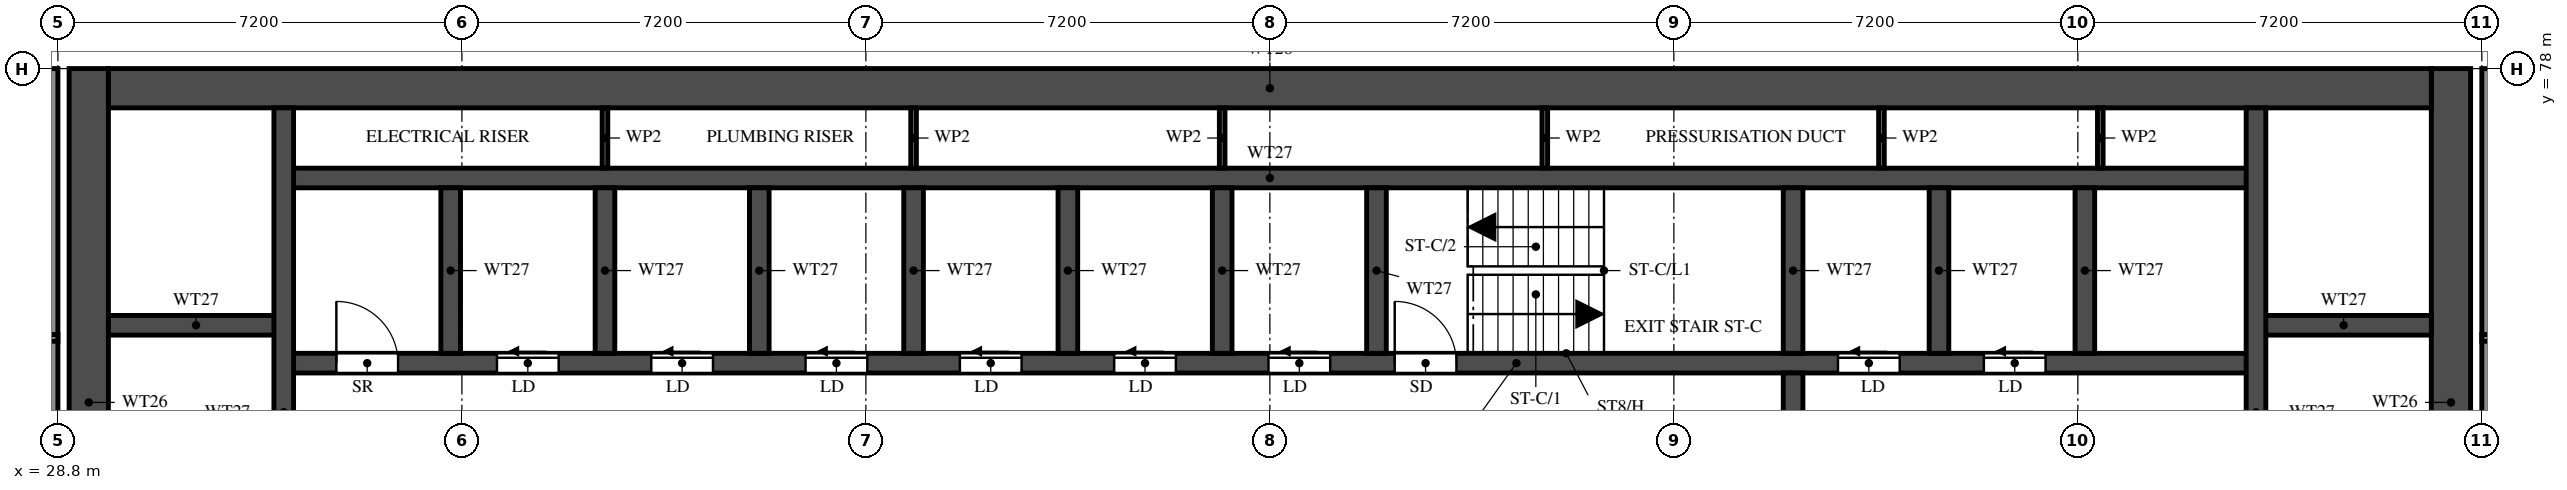
"""IFC4 building model, lengths in metres.
Left out: names, types, materials, properties, quantities, classifications, styles, units other than length and angle.
Written with IfcOpenShell. Run it as: python <this file> out.ifc"""

import sys

from ifc_helpers import new_model, si_unit, direction, frame, frame_2d, origin, place, context, subcontext, project, spatial, rectangle, extrude, element, fill, save


model = new_model("IFC4")
c1 = context("Model", 3, precision=1e-05, world=origin(), true_north=direction((0.0, 1.0)))
c2 = subcontext(c1, "Body", "Model", "MODEL_VIEW")
j1 = project(units=[si_unit("LENGTHUNIT", "METRE"), si_unit("PLANEANGLEUNIT", "RADIAN")], contexts=[c1])
p1 = place(None, origin())
s1 = spatial("IfcSite", under=j1, at=p1, CompositionType="ELEMENT")
p2 = place(p1, origin())
s2 = spatial("IfcBuilding", under=s1, at=p2, CompositionType="ELEMENT")
p3 = place(p2, frame((0.0, 0.0, 164.0)))
s3 = spatial("IfcBuildingStorey", under=s2, at=p3, CompositionType="ELEMENT", Elevation=164.0)
for number, where, z_axis, x_axis in (
    (1, (29.35, 66.1, 0.0), (0.0, 0.0, 1.0), (0.0, 1.0, 0.0)),
    (2, (71.45, 66.1, 0.0), (0.0, 0.0, 1.0), (0.0, 1.0, 0.0)),
):
    element("IfcWall", number, at=place(p3, frame(where, z_axis=z_axis, x_axis=x_axis)), inside=s3, PredefinedType="SHEAR", context=c2, shape_type="SweptSolid", body=[
        extrude(rectangle(XDim=11.9, YDim=0.7, at=frame_2d((5.95, 0.0))), origin(), (0.0, 0.0, 1.0), 3.2),
    ])
p4 = place(p3, frame((29.7, 77.65, 0.0), z_axis=(0.0, 0.0, 1.0), x_axis=(1.0, 0.0, 0.0)))
e3 = element("IfcWall", 3, at=p4, inside=s3, PredefinedType="SHEAR", context=c2, shape_type="SweptSolid", body=[
    extrude(rectangle(XDim=41.4, YDim=0.7, at=frame_2d((20.7, 0.0))), origin(), (0.0, 0.0, 1.0), 3.2),
])
p5 = place(p3, frame((32.825, 72.75, 0.0), z_axis=(0.0, 0.0, 1.0), x_axis=(1.0, 0.0, 0.0)))
e4 = element("IfcWall", 4, at=p5, inside=s3, PredefinedType="SHEAR", context=c2, shape_type="SweptSolid", body=[
    extrude(rectangle(XDim=35.15, YDim=0.35, at=frame_2d((17.575, 0.0))), origin(), (0.0, 0.0, 1.0), 3.2),
])
p6 = place(p5, frame((19.8, 0.0, 0.0)))
e5 = element("IfcOpeningElement", 5, at=p6, cuts=e4, PredefinedType="OPENING", context=c2, shape_type="SweptSolid", body=[
    extrude(rectangle(XDim=1.1, YDim=2.1, at=frame_2d((0.55, 1.05))), frame((0.0, 0.185, 0.0), z_axis=(0.0, -1.0, 0.0), x_axis=(1.0, 0.0, 0.0)), (0.0, 0.0, 1.0), 0.37),
])
p7 = place(p5, frame((27.7, 0.0, 0.0)))
e6 = element("IfcOpeningElement", 6, at=p7, cuts=e4, PredefinedType="OPENING", context=c2, shape_type="SweptSolid", body=[
    extrude(rectangle(XDim=1.1, YDim=2.1, at=frame_2d((0.55, 1.05))), frame((0.0, 0.185, 0.0), z_axis=(0.0, -1.0, 0.0), x_axis=(1.0, 0.0, 0.0)), (0.0, 0.0, 1.0), 0.37),
])
p8 = place(p5, frame((30.3, 0.0, 0.0)))
e7 = element("IfcOpeningElement", 7, at=p8, cuts=e4, PredefinedType="OPENING", context=c2, shape_type="SweptSolid", body=[
    extrude(rectangle(XDim=1.1, YDim=2.1, at=frame_2d((0.55, 1.05))), frame((0.0, 0.185, 0.0), z_axis=(0.0, -1.0, 0.0), x_axis=(1.0, 0.0, 0.0)), (0.0, 0.0, 1.0), 0.37),
])
p9 = place(p5, frame((3.8, 0.0, 0.0)))
e8 = element("IfcOpeningElement", 8, at=p9, cuts=e4, PredefinedType="OPENING", context=c2, shape_type="SweptSolid", body=[
    extrude(rectangle(XDim=1.1, YDim=2.1, at=frame_2d((0.55, 1.05))), frame((0.0, 0.185, 0.0), z_axis=(0.0, -1.0, 0.0), x_axis=(1.0, 0.0, 0.0)), (0.0, 0.0, 1.0), 0.37),
])
p10 = place(p5, frame((6.55, 0.0, 0.0)))
e9 = element("IfcOpeningElement", 9, at=p10, cuts=e4, PredefinedType="OPENING", context=c2, shape_type="SweptSolid", body=[
    extrude(rectangle(XDim=1.1, YDim=2.1, at=frame_2d((0.55, 1.05))), frame((0.0, 0.185, 0.0), z_axis=(0.0, -1.0, 0.0), x_axis=(1.0, 0.0, 0.0)), (0.0, 0.0, 1.0), 0.37),
])
p11 = place(p5, frame((9.3, 0.0, 0.0)))
e10 = element("IfcOpeningElement", 10, at=p11, cuts=e4, PredefinedType="OPENING", context=c2, shape_type="SweptSolid", body=[
    extrude(rectangle(XDim=1.1, YDim=2.1, at=frame_2d((0.55, 1.05))), frame((0.0, 0.185, 0.0), z_axis=(0.0, -1.0, 0.0), x_axis=(1.0, 0.0, 0.0)), (0.0, 0.0, 1.0), 0.37),
])
p12 = place(p5, frame((12.05, 0.0, 0.0)))
e11 = element("IfcOpeningElement", 11, at=p12, cuts=e4, PredefinedType="OPENING", context=c2, shape_type="SweptSolid", body=[
    extrude(rectangle(XDim=1.1, YDim=2.1, at=frame_2d((0.55, 1.05))), frame((0.0, 0.185, 0.0), z_axis=(0.0, -1.0, 0.0), x_axis=(1.0, 0.0, 0.0)), (0.0, 0.0, 1.0), 0.37),
])
p13 = place(p5, frame((14.8, 0.0, 0.0)))
e12 = element("IfcOpeningElement", 12, at=p13, cuts=e4, PredefinedType="OPENING", context=c2, shape_type="SweptSolid", body=[
    extrude(rectangle(XDim=1.1, YDim=2.1, at=frame_2d((0.55, 1.05))), frame((0.0, 0.185, 0.0), z_axis=(0.0, -1.0, 0.0), x_axis=(1.0, 0.0, 0.0)), (0.0, 0.0, 1.0), 0.37),
])
p14 = place(p5, frame((17.55, 0.0, 0.0)))
e13 = element("IfcOpeningElement", 13, at=p14, cuts=e4, PredefinedType="OPENING", context=c2, shape_type="SweptSolid", body=[
    extrude(rectangle(XDim=1.1, YDim=2.1, at=frame_2d((0.55, 1.05))), frame((0.0, 0.185, 0.0), z_axis=(0.0, -1.0, 0.0), x_axis=(1.0, 0.0, 0.0)), (0.0, 0.0, 1.0), 0.37),
])
p15 = place(p5, frame((0.938, 0.0, 0.0)))
e14 = element("IfcOpeningElement", 14, at=p15, cuts=e4, PredefinedType="OPENING", context=c2, shape_type="SweptSolid", body=[
    extrude(rectangle(XDim=1.1, YDim=2.1, at=frame_2d((0.55, 1.05))), frame((0.0, 0.185, 0.0), z_axis=(0.0, -1.0, 0.0), x_axis=(1.0, 0.0, 0.0)), (0.0, 0.0, 1.0), 0.37),
])
p16 = place(p3, frame((32.825, 76.05, 0.0), z_axis=(0.0, 0.0, 1.0), x_axis=(1.0, 0.0, 0.0)))
e15 = element("IfcWall", 15, at=p16, inside=s3, PredefinedType="SHEAR", context=c2, shape_type="SweptSolid", body=[
    extrude(rectangle(XDim=35.15, YDim=0.35, at=frame_2d((17.575, 0.0))), origin(), (0.0, 0.0, 1.0), 3.2),
])
for number, where, z_axis, x_axis in (
    (16, (29.7, 73.425, 0.0), (0.0, 0.0, 1.0), (1.0, 0.0, 0.0)),
    (17, (67.975, 73.425, 0.0), (0.0, 0.0, 1.0), (1.0, 0.0, 0.0)),
):
    element("IfcWall", number, at=place(p3, frame(where, z_axis=z_axis, x_axis=x_axis)), inside=s3, PredefinedType="SHEAR", context=c2, shape_type="SweptSolid", body=[
        extrude(rectangle(XDim=3.125, YDim=0.35, at=frame_2d((1.562, 0.0))), origin(), (0.0, 0.0, 1.0), 3.2),
    ])
p17 = place(p3, frame((32.825, 66.45, 0.0), z_axis=(0.0, 0.0, 1.0), x_axis=(0.0, 1.0, 0.0)))
e18 = element("IfcWall", 18, at=p17, inside=s3, PredefinedType="SHEAR", context=c2, shape_type="SweptSolid", body=[
    extrude(rectangle(XDim=10.85, YDim=0.35, at=frame_2d((5.425, 0.0))), origin(), (0.0, 0.0, 1.0), 3.2),
])
p18 = place(p3, frame((67.975, 66.45, 0.0), z_axis=(0.0, 0.0, 1.0), x_axis=(0.0, 1.0, 0.0)))
e19 = element("IfcWall", 19, at=p18, inside=s3, PredefinedType="SHEAR", context=c2, shape_type="SweptSolid", body=[
    extrude(rectangle(XDim=10.85, YDim=0.35, at=frame_2d((5.425, 0.0))), origin(), (0.0, 0.0, 1.0), 3.2),
])
p19 = place(p18, frame((0.15, 0.0, 0.0)))
e20 = element("IfcOpeningElement", 20, at=p19, cuts=e19, PredefinedType="OPENING", context=c2, shape_type="SweptSolid", body=[
    extrude(rectangle(XDim=1.1, YDim=2.1, at=frame_2d((0.55, 1.05))), frame((0.0, 0.185, 0.0), z_axis=(0.0, -1.0, 0.0), x_axis=(1.0, 0.0, 0.0)), (0.0, 0.0, 1.0), 0.37),
])
p20 = place(p3, frame((59.725, 66.45, 0.0), z_axis=(0.0, 0.0, 1.0), x_axis=(0.0, 1.0, 0.0)))
e21 = element("IfcWall", 21, at=p20, inside=s3, PredefinedType="SHEAR", context=c2, shape_type="SweptSolid", body=[
    extrude(rectangle(XDim=6.125, YDim=0.35, at=frame_2d((3.062, 0.0))), origin(), (0.0, 0.0, 1.0), 3.2),
])
p21 = place(p20, frame((3.85, 0.0, 0.0)))
e22 = element("IfcOpeningElement", 22, at=p21, cuts=e21, PredefinedType="OPENING", context=c2, shape_type="SweptSolid", body=[
    extrude(rectangle(XDim=1.2, YDim=2.1, at=frame_2d((0.6, 1.05))), frame((0.0, 0.185, 0.0), z_axis=(0.0, -1.0, 0.0), x_axis=(1.0, 0.0, 0.0)), (0.0, 0.0, 1.0), 0.37),
])
for number, where, z_axis, x_axis in (
    (23, (59.725, 72.925, 0.0), (0.0, 0.0, 1.0), (0.0, 1.0, 0.0)),
    (24, (35.8, 72.925, 0.0), (0.0, 0.0, 1.0), (0.0, 1.0, 0.0)),
    (25, (38.55, 72.925, 0.0), (0.0, 0.0, 1.0), (0.0, 1.0, 0.0)),
    (26, (41.3, 72.925, 0.0), (0.0, 0.0, 1.0), (0.0, 1.0, 0.0)),
    (27, (44.05, 72.925, 0.0), (0.0, 0.0, 1.0), (0.0, 1.0, 0.0)),
    (28, (46.8, 72.925, 0.0), (0.0, 0.0, 1.0), (0.0, 1.0, 0.0)),
    (29, (49.55, 72.925, 0.0), (0.0, 0.0, 1.0), (0.0, 1.0, 0.0)),
    (30, (52.3, 72.925, 0.0), (0.0, 0.0, 1.0), (0.0, 1.0, 0.0)),
    (31, (62.325, 72.925, 0.0), (0.0, 0.0, 1.0), (0.0, 1.0, 0.0)),
    (32, (64.925, 72.925, 0.0), (0.0, 0.0, 1.0), (0.0, 1.0, 0.0)),
):
    element("IfcWall", number, at=place(p3, frame(where, z_axis=z_axis, x_axis=x_axis)), inside=s3, PredefinedType="SHEAR", context=c2, shape_type="SweptSolid", body=[
        extrude(rectangle(XDim=2.95, YDim=0.35, at=frame_2d((1.475, 0.0))), origin(), (0.0, 0.0, 1.0), 3.2),
    ])
for number, where, z_axis, x_axis in (
    (33, (38.55, 76.225, 0.0), (0.0, 0.0, 1.0), (0.0, 1.0, 0.0)),
    (34, (44.05, 76.225, 0.0), (0.0, 0.0, 1.0), (0.0, 1.0, 0.0)),
    (35, (49.55, 76.225, 0.0), (0.0, 0.0, 1.0), (0.0, 1.0, 0.0)),
    (36, (55.3, 76.225, 0.0), (0.0, 0.0, 1.0), (0.0, 1.0, 0.0)),
    (37, (61.3, 76.225, 0.0), (0.0, 0.0, 1.0), (0.0, 1.0, 0.0)),
    (38, (65.2, 76.225, 0.0), (0.0, 0.0, 1.0), (0.0, 1.0, 0.0)),
):
    element("IfcWall", number, at=place(p3, frame(where, z_axis=z_axis, x_axis=x_axis)), inside=s3, PredefinedType="PARTITIONING", context=c2, shape_type="SweptSolid", body=[
        extrude(rectangle(XDim=1.075, YDim=0.1, at=frame_2d((0.538, 0.0))), origin(), (0.0, 0.0, 1.0), 3.2),
    ])
for number, where, z_axis, x_axis in (
    (39, (28.7, 62.4, 0.0), (0.0, 0.0, 1.0), (0.0, 1.0, 0.0)),
    (40, (72.1, 62.4, 0.0), (0.0, 0.0, 1.0), (0.0, 1.0, 0.0)),
):
    element("IfcWall", number, at=place(p3, frame(where, z_axis=z_axis, x_axis=x_axis)), inside=s3, PredefinedType="SOLIDWALL", context=c2, shape_type="SweptSolid", body=[
        extrude(rectangle(XDim=15.6, YDim=0.2, at=frame_2d((7.8, 0.0))), origin(), (0.0, 0.0, 1.0), 3.2),
    ])
p22 = place(p3, frame((14.525, 73.2, 0.0), z_axis=(0.0, 0.0, 1.0), x_axis=(1.0, 0.0, 0.0)))
e41 = element("IfcWall", 41, at=p22, inside=s3, PredefinedType="PARTITIONING", context=c2, shape_type="SweptSolid", body=[
    extrude(rectangle(XDim=14.275, YDim=0.12, at=frame_2d((7.138, 0.0))), origin(), (0.0, 0.0, 1.0), 2.3),
])
p23 = place(p22, frame((7.675, 0.0, 0.0)))
e42 = element("IfcOpeningElement", 42, at=p23, cuts=e41, PredefinedType="OPENING", context=c2, shape_type="SweptSolid", body=[
    extrude(rectangle(XDim=0.9, YDim=2.1, at=frame_2d((0.45, 1.05))), frame((0.0, 0.07, 0.0), z_axis=(0.0, -1.0, 0.0), x_axis=(1.0, 0.0, 0.0)), (0.0, 0.0, 1.0), 0.14),
])
p24 = place(p3, frame((72.0, 73.2, 0.0), z_axis=(0.0, 0.0, 1.0), x_axis=(1.0, 0.0, 0.0)))
e43 = element("IfcWall", 43, at=p24, inside=s3, PredefinedType="PARTITIONING", context=c2, shape_type="SweptSolid", body=[
    extrude(rectangle(XDim=14.275, YDim=0.12, at=frame_2d((7.137, 0.0))), origin(), (0.0, 0.0, 1.0), 2.3),
])
p25 = place(p24, frame((5.7, 0.0, 0.0)))
e44 = element("IfcOpeningElement", 44, at=p25, cuts=e43, PredefinedType="OPENING", context=c2, shape_type="SweptSolid", body=[
    extrude(rectangle(XDim=0.9, YDim=2.1, at=frame_2d((0.45, 1.05))), frame((0.0, 0.07, 0.0), z_axis=(0.0, -1.0, 0.0), x_axis=(1.0, 0.0, 0.0)), (0.0, 0.0, 1.0), 0.14),
])
p26 = place(p6, origin())
e45 = element("IfcDoor", 45, at=p26, inside=s3, OperationType="SINGLE_SWING_LEFT", PredefinedType="DOOR", context=c2, shape_type="SweptSolid", body=[
    extrude(rectangle(XDim=1.1, YDim=2.1, at=frame_2d((0.55, 1.05))), frame((0.0, 0.025, 0.0), z_axis=(0.0, -1.0, 0.0), x_axis=(1.0, 0.0, 0.0)), (0.0, 0.0, 1.0), 0.05),
])
fill(e5, e45)
p27 = place(p7, origin())
e46 = element("IfcDoor", 46, at=p27, inside=s3, OperationType="SLIDING_TO_LEFT", PredefinedType="DOOR", context=c2, shape_type="SweptSolid", body=[
    extrude(rectangle(XDim=1.1, YDim=2.1, at=frame_2d((0.55, 1.05))), frame((0.0, 0.025, 0.0), z_axis=(0.0, -1.0, 0.0), x_axis=(1.0, 0.0, 0.0)), (0.0, 0.0, 1.0), 0.05),
])
fill(e6, e46)
p28 = place(p8, origin())
e47 = element("IfcDoor", 47, at=p28, inside=s3, OperationType="SLIDING_TO_LEFT", PredefinedType="DOOR", context=c2, shape_type="SweptSolid", body=[
    extrude(rectangle(XDim=1.1, YDim=2.1, at=frame_2d((0.55, 1.05))), frame((0.0, 0.025, 0.0), z_axis=(0.0, -1.0, 0.0), x_axis=(1.0, 0.0, 0.0)), (0.0, 0.0, 1.0), 0.05),
])
fill(e7, e47)
p29 = place(p9, origin())
e48 = element("IfcDoor", 48, at=p29, inside=s3, OperationType="SLIDING_TO_LEFT", PredefinedType="DOOR", context=c2, shape_type="SweptSolid", body=[
    extrude(rectangle(XDim=1.1, YDim=2.1, at=frame_2d((0.55, 1.05))), frame((0.0, 0.025, 0.0), z_axis=(0.0, -1.0, 0.0), x_axis=(1.0, 0.0, 0.0)), (0.0, 0.0, 1.0), 0.05),
])
fill(e8, e48)
p30 = place(p10, origin())
e49 = element("IfcDoor", 49, at=p30, inside=s3, OperationType="SLIDING_TO_LEFT", PredefinedType="DOOR", context=c2, shape_type="SweptSolid", body=[
    extrude(rectangle(XDim=1.1, YDim=2.1, at=frame_2d((0.55, 1.05))), frame((0.0, 0.025, 0.0), z_axis=(0.0, -1.0, 0.0), x_axis=(1.0, 0.0, 0.0)), (0.0, 0.0, 1.0), 0.05),
])
fill(e9, e49)
p31 = place(p11, origin())
e50 = element("IfcDoor", 50, at=p31, inside=s3, OperationType="SLIDING_TO_LEFT", PredefinedType="DOOR", context=c2, shape_type="SweptSolid", body=[
    extrude(rectangle(XDim=1.1, YDim=2.1, at=frame_2d((0.55, 1.05))), frame((0.0, 0.025, 0.0), z_axis=(0.0, -1.0, 0.0), x_axis=(1.0, 0.0, 0.0)), (0.0, 0.0, 1.0), 0.05),
])
fill(e10, e50)
p32 = place(p12, origin())
e51 = element("IfcDoor", 51, at=p32, inside=s3, OperationType="SLIDING_TO_LEFT", PredefinedType="DOOR", context=c2, shape_type="SweptSolid", body=[
    extrude(rectangle(XDim=1.1, YDim=2.1, at=frame_2d((0.55, 1.05))), frame((0.0, 0.025, 0.0), z_axis=(0.0, -1.0, 0.0), x_axis=(1.0, 0.0, 0.0)), (0.0, 0.0, 1.0), 0.05),
])
fill(e11, e51)
p33 = place(p13, origin())
e52 = element("IfcDoor", 52, at=p33, inside=s3, OperationType="SLIDING_TO_LEFT", PredefinedType="DOOR", context=c2, shape_type="SweptSolid", body=[
    extrude(rectangle(XDim=1.1, YDim=2.1, at=frame_2d((0.55, 1.05))), frame((0.0, 0.025, 0.0), z_axis=(0.0, -1.0, 0.0), x_axis=(1.0, 0.0, 0.0)), (0.0, 0.0, 1.0), 0.05),
])
fill(e12, e52)
p34 = place(p14, origin())
e53 = element("IfcDoor", 53, at=p34, inside=s3, OperationType="SLIDING_TO_LEFT", PredefinedType="DOOR", context=c2, shape_type="SweptSolid", body=[
    extrude(rectangle(XDim=1.1, YDim=2.1, at=frame_2d((0.55, 1.05))), frame((0.0, 0.025, 0.0), z_axis=(0.0, -1.0, 0.0), x_axis=(1.0, 0.0, 0.0)), (0.0, 0.0, 1.0), 0.05),
])
fill(e13, e53)
p35 = place(p15, origin())
e54 = element("IfcDoor", 54, at=p35, inside=s3, OperationType="SINGLE_SWING_LEFT", PredefinedType="DOOR", context=c2, shape_type="SweptSolid", body=[
    extrude(rectangle(XDim=1.1, YDim=2.1, at=frame_2d((0.55, 1.05))), frame((0.0, 0.025, 0.0), z_axis=(0.0, -1.0, 0.0), x_axis=(1.0, 0.0, 0.0)), (0.0, 0.0, 1.0), 0.05),
])
fill(e14, e54)
save(model, sys.argv[1])
